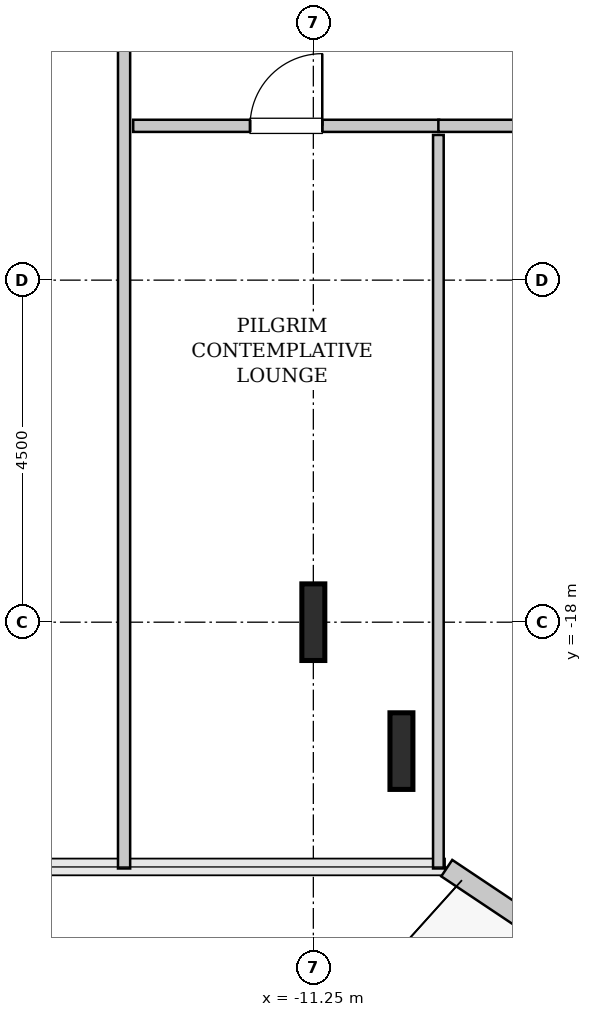
"""IFC4 building model, lengths in metres.
Left out: names, types, materials, properties, quantities, classifications, styles, units other than length and angle.
Written with IfcOpenShell. Run it as: python <this file> out.ifc"""

import sys

from ifc_helpers import new_model, si_unit, direction, frame, frame_2d, origin, origin_2d, place, context, subcontext, project, spatial, rectangle, i_section, extrude, source, transform, mapped, element, fill, save


model = new_model("IFC4")
c1 = context("Model", 3, precision=1e-05, world=origin(), true_north=direction((0.0, 1.0)))
c2 = subcontext(c1, "Body", "Model", "MODEL_VIEW")
j1 = project(units=[si_unit("LENGTHUNIT", "METRE"), si_unit("PLANEANGLEUNIT", "RADIAN")], contexts=[c1])
p1 = place(None, origin())
s1 = spatial("IfcSite", under=j1, at=p1, CompositionType="ELEMENT")
p2 = place(p1, origin())
s2 = spatial("IfcBuilding", under=s1, at=p2, CompositionType="ELEMENT")
p3 = place(p2, frame((0.0, 0.0, 113.6)))
s3 = spatial("IfcBuildingStorey", under=s2, at=p3, CompositionType="ELEMENT", Elevation=113.6)
m1 = source(origin(), c2, "Body", "SweptSolid", [
    extrude(i_section(OverallWidth=0.302, OverallDepth=1.008, WebThickness=0.021, FlangeThickness=0.04, FilletRadius=0.03, at=origin_2d()), origin(), (0.0, 0.0, 1.0), 3.8),
])
for number, where, z_axis, x_axis in (
    (1, (-11.25, -18.0, 0.0), (0.0, 0.0, 1.0), (1.0, 0.0, 0.0)),
    (2, (-10.091, -19.696, 0.0), (0.0, 0.0, 1.0), (1.0, 0.0, 0.0)),
):
    element("IfcColumn", number, at=place(p3, frame(where, z_axis=z_axis, x_axis=x_axis)), inside=s3, PredefinedType="COLUMN", context=c2, shape_type="MappedRepresentation", body=[
        mapped(m1, transform((0.0, 0.0, 0.0), x_axis=(1.0, 0.0, 0.0), y_axis=(0.0, 1.0, 0.0), z_axis=(0.0, 0.0, 1.0), scale=1.0)),
    ])
m2 = source(origin(), c2, "Body", "SweptSolid", [
    extrude(rectangle(XDim=1.469, YDim=0.26, at=frame_2d((0.734, 0.0))), origin(), (0.0, 0.0, 1.0), 3.55),
])
p4 = place(p3, frame((-9.495, -21.236, 0.0), z_axis=(0.0, 0.0, 1.0), x_axis=(0.831461760506, -0.555581983884, 0.0)))
e3 = element("IfcWall", 3, at=p4, inside=s3, PredefinedType="SOLIDWALL", context=c2, shape_type="MappedRepresentation", body=[
    mapped(m2, transform((0.0, 0.0, 0.0), x_axis=(1.0, 0.0, 0.0), y_axis=(0.0, 1.0, 0.0), z_axis=(0.0, 0.0, 1.0), scale=1.0)),
])
m3 = source(origin(), c2, "Body", "SweptSolid", [
    extrude(rectangle(XDim=12.745, YDim=0.16, at=frame_2d((6.373, 0.0))), origin(), (0.0, 0.0, 1.0), 3.535),
])
p5 = place(p3, frame((-13.74, -21.24, 0.0), z_axis=(0.0, 0.0, 1.0), x_axis=(0.0, 1.0, 0.0)))
e4 = element("IfcWall", 4, at=p5, inside=s3, PredefinedType="PARTITIONING", context=c2, shape_type="MappedRepresentation", body=[
    mapped(m3, transform((0.0, 0.0, 0.0), x_axis=(1.0, 0.0, 0.0), y_axis=(0.0, 1.0, 0.0), z_axis=(0.0, 0.0, 1.0), scale=1.0)),
])
p6 = place(p5, frame((10.762, 0.0, 0.0)))
e5 = element("IfcOpeningElement", 5, at=p6, cuts=e4, PredefinedType="OPENING", context=c2, shape_type="SweptSolid", body=[
    extrude(rectangle(XDim=0.95, YDim=2.1, at=frame_2d((0.475, 1.05))), frame((0.0, 0.09, 0.0), z_axis=(0.0, -1.0, 0.0), x_axis=(1.0, 0.0, 0.0)), (0.0, 0.0, 1.0), 0.18),
])
m4 = source(origin(), c2, "Body", "SweptSolid", [
    extrude(rectangle(XDim=4.025, YDim=0.16, at=frame_2d((2.013, 0.0))), origin(), (0.0, 0.0, 1.0), 3.535),
])
p7 = place(p3, frame((-13.62, -11.47, 0.0), z_axis=(0.0, 0.0, 1.0), x_axis=(1.0, 0.0, 0.0)))
e6 = element("IfcWall", 6, at=p7, inside=s3, PredefinedType="PARTITIONING", context=c2, shape_type="MappedRepresentation", body=[
    mapped(m4, transform((0.0, 0.0, 0.0), x_axis=(1.0, 0.0, 0.0), y_axis=(0.0, 1.0, 0.0), z_axis=(0.0, 0.0, 1.0), scale=1.0)),
])
p8 = place(p7, frame((1.538, 0.0, 0.0)))
e7 = element("IfcOpeningElement", 7, at=p8, cuts=e6, PredefinedType="OPENING", context=c2, shape_type="SweptSolid", body=[
    extrude(rectangle(XDim=0.95, YDim=2.1, at=frame_2d((0.475, 1.05))), frame((0.0, 0.09, 0.0), z_axis=(0.0, -1.0, 0.0), x_axis=(1.0, 0.0, 0.0)), (0.0, 0.0, 1.0), 0.18),
])
m5 = source(origin(), c2, "Body", "SweptSolid", [
    extrude(rectangle(XDim=9.65, YDim=0.14, at=frame_2d((4.825, 0.0))), origin(), (0.0, 0.0, 1.0), 3.535),
])
p9 = place(p3, frame((-9.605, -21.24, 0.0), z_axis=(0.0, 0.0, 1.0), x_axis=(0.0, 1.0, 0.0)))
e8 = element("IfcWall", 8, at=p9, inside=s3, PredefinedType="PARTITIONING", context=c2, shape_type="MappedRepresentation", body=[
    mapped(m5, transform((0.0, 0.0, 0.0), x_axis=(1.0, 0.0, 0.0), y_axis=(0.0, 1.0, 0.0), z_axis=(0.0, 0.0, 1.0), scale=1.0)),
])
m6 = source(origin(), c2, "Body", "SweptSolid", [
    extrude(rectangle(XDim=4.61, YDim=0.16, at=frame_2d((2.305, 0.0))), origin(), (0.0, 0.0, 1.0), 3.535),
])
p10 = place(p3, frame((-9.605, -11.47, 0.0), z_axis=(0.0, 0.0, 1.0), x_axis=(1.0, 0.0, 0.0)))
e9 = element("IfcWall", 9, at=p10, inside=s3, PredefinedType="PARTITIONING", context=c2, shape_type="MappedRepresentation", body=[
    mapped(m6, transform((0.0, 0.0, 0.0), x_axis=(1.0, 0.0, 0.0), y_axis=(0.0, 1.0, 0.0), z_axis=(0.0, 0.0, 1.0), scale=1.0)),
])
p11 = place(p10, frame((1.83, 0.0, 0.0)))
e10 = element("IfcOpeningElement", 10, at=p11, cuts=e9, PredefinedType="OPENING", context=c2, shape_type="SweptSolid", body=[
    extrude(rectangle(XDim=0.95, YDim=2.1, at=frame_2d((0.475, 1.05))), frame((0.0, 0.09, 0.0), z_axis=(0.0, -1.0, 0.0), x_axis=(1.0, 0.0, 0.0)), (0.0, 0.0, 1.0), 0.18),
])
m7 = source(origin(), c2, "Body", "SweptSolid", [
    extrude(rectangle(XDim=0.95, YDim=2.1, at=frame_2d((0.475, 1.05))), frame((0.0, 0.025, 0.0), z_axis=(0.0, -1.0, 0.0), x_axis=(1.0, 0.0, 0.0)), (0.0, 0.0, 1.0), 0.05),
])
p12 = place(p8, origin())
e11 = element("IfcDoor", 11, at=p12, inside=s3, OperationType="SINGLE_SWING_RIGHT", PredefinedType="DOOR", context=c2, shape_type="MappedRepresentation", body=[
    mapped(m7, transform((0.0, 0.0, 0.0), x_axis=(1.0, 0.0, 0.0), y_axis=(0.0, 1.0, 0.0), z_axis=(0.0, 0.0, 1.0), scale=1.0)),
])
fill(e7, e11)
save(model, sys.argv[1])
